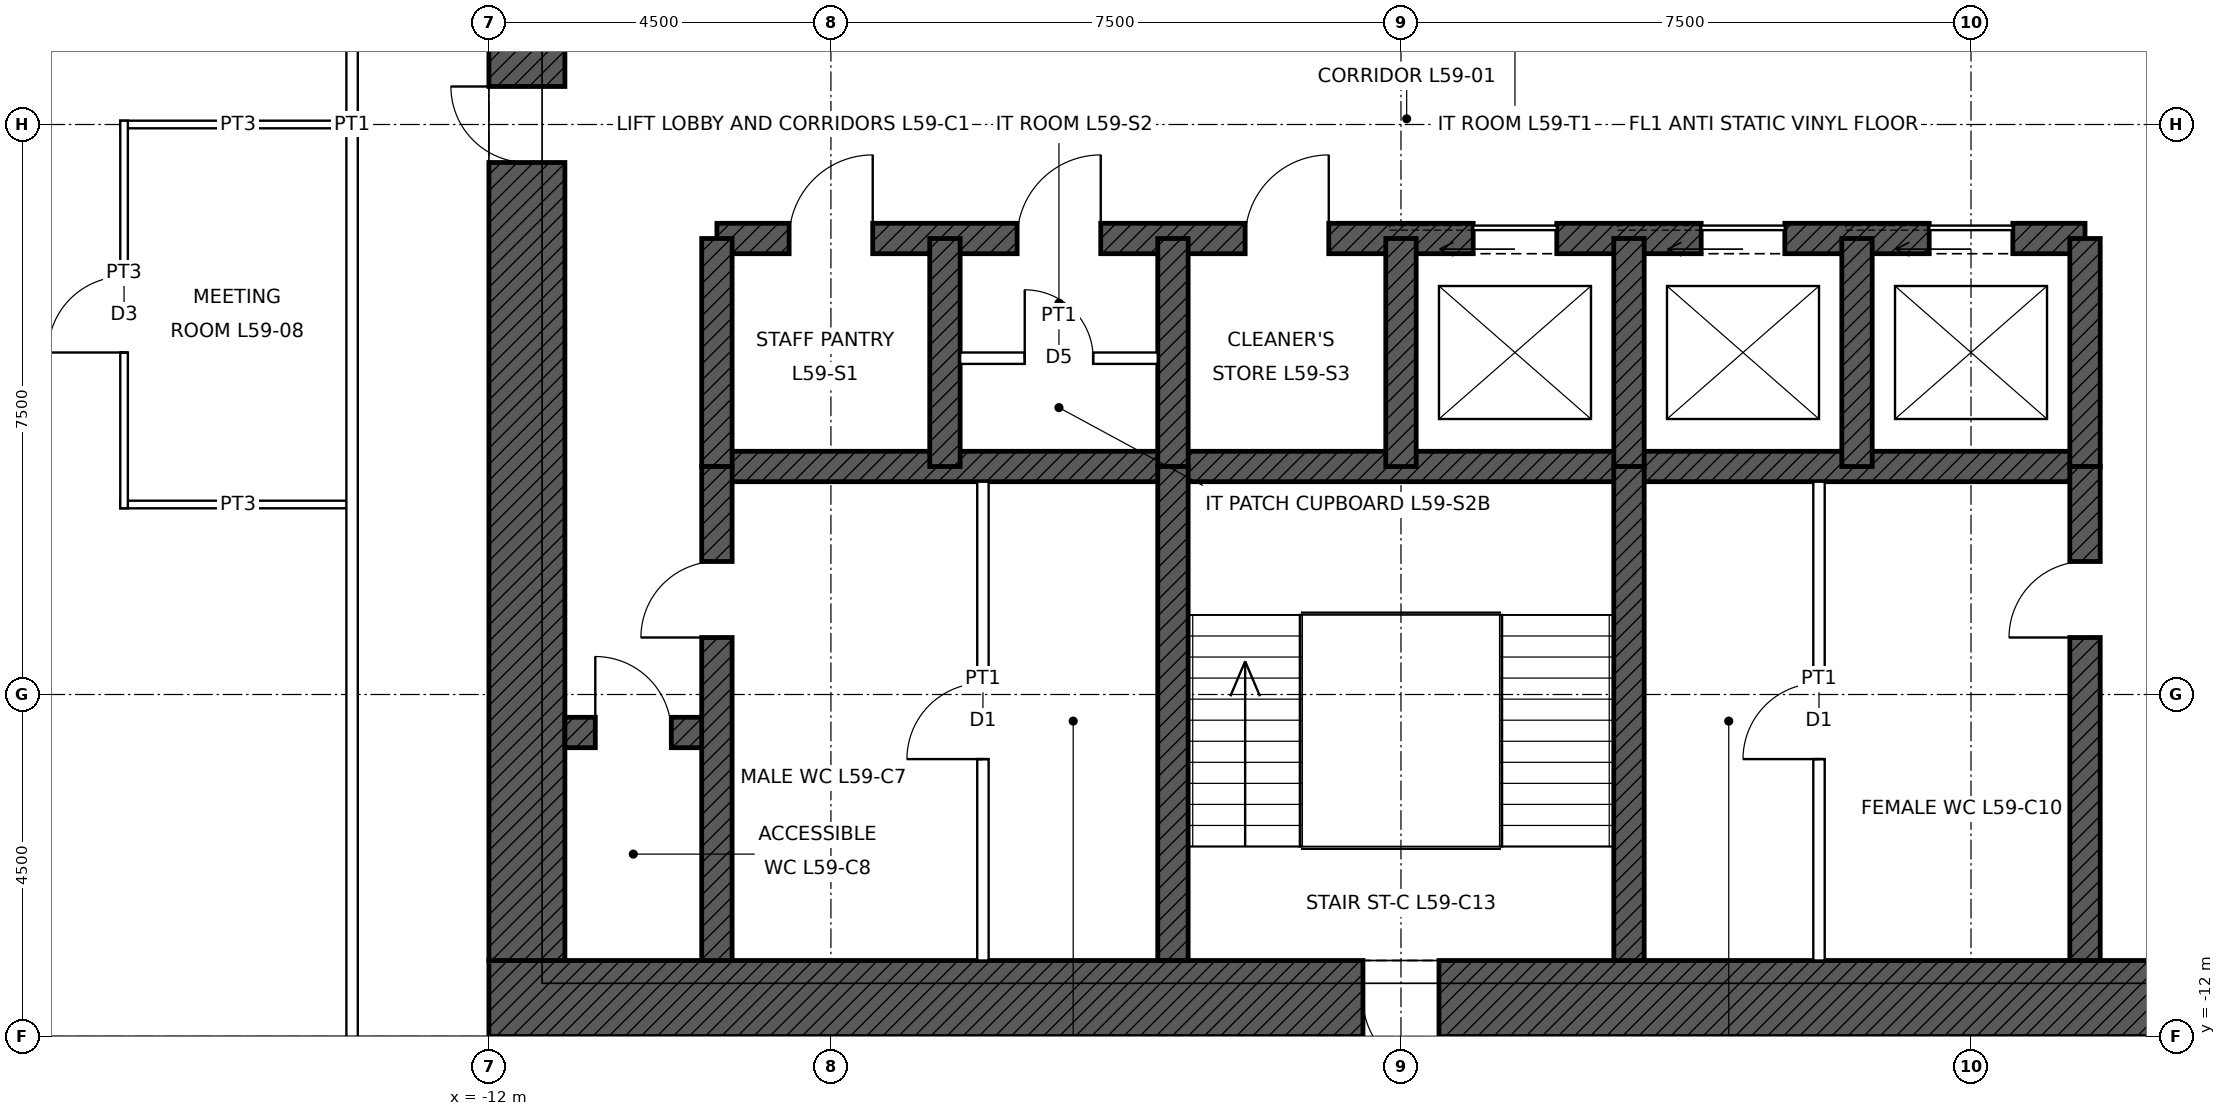
"""IFC4 building model, lengths in metres.
Left out: names, types, materials, properties, quantities, classifications, styles, units other than length and angle.
Written with IfcOpenShell. Run it as: python <this file> out.ifc"""

import sys

from ifc_helpers import new_model, si_unit, direction, frame, frame_2d, origin, place, context, subcontext, project, spatial, rectangle, extrude, element, fill, save


model = new_model("IFC4")
c1 = context("Model", 3, precision=1e-05, world=origin(), true_north=direction((0.0, 1.0)))
c2 = subcontext(c1, "Body", "Model", "MODEL_VIEW")
j1 = project(units=[si_unit("LENGTHUNIT", "METRE"), si_unit("PLANEANGLEUNIT", "RADIAN")], contexts=[c1])
p1 = place(None, origin())
s1 = spatial("IfcSite", under=j1, at=p1, CompositionType="ELEMENT")
p2 = place(p1, origin())
s2 = spatial("IfcBuilding", under=s1, at=p2, CompositionType="ELEMENT")
p3 = place(p2, frame((0.0, 0.0, 271.9)))
s3 = spatial("IfcBuildingStorey", under=s2, at=p3, CompositionType="ELEMENT", Elevation=271.9)
p4 = place(p3, frame((12.0, -11.5, 0.0), z_axis=(0.0, 0.0, 1.0), x_axis=(-1.0, 0.0, 0.0)))
e1 = element("IfcWall", 1, at=p4, inside=s3, PredefinedType="SHEAR", context=c2, shape_type="SweptSolid", body=[
    extrude(rectangle(XDim=24.0, YDim=1.0, at=frame_2d((12.0, 0.0))), origin(), (0.0, 0.0, 1.0), 4.0),
])
p5 = place(p4, frame((11.5, 0.0, 0.0)))
e2 = element("IfcOpeningElement", 2, at=p5, cuts=e1, PredefinedType="OPENING", context=c2, shape_type="SweptSolid", body=[
    extrude(rectangle(XDim=1.0, YDim=2.1, at=frame_2d((0.5, 1.05))), frame((0.0, 0.51, 0.0), z_axis=(0.0, -1.0, 0.0), x_axis=(1.0, 0.0, 0.0)), (0.0, 0.0, 1.0), 1.02),
])
p6 = place(p4, frame((1.0, 0.0, 0.0)))
e3 = element("IfcOpeningElement", 3, at=p6, cuts=e1, PredefinedType="OPENING", context=c2, shape_type="SweptSolid", body=[
    extrude(rectangle(XDim=1.0, YDim=2.4, at=frame_2d((0.5, 1.2))), frame((0.0, 0.51, 0.0), z_axis=(0.0, -1.0, 0.0), x_axis=(1.0, 0.0, 0.0)), (0.0, 0.0, 1.0), 1.02),
])
p7 = place(p3, frame((-11.5, -11.0, 0.0), z_axis=(0.0, 0.0, 1.0), x_axis=(0.0, 1.0, 0.0)))
e4 = element("IfcWall", 4, at=p7, inside=s3, PredefinedType="SHEAR", context=c2, shape_type="SweptSolid", body=[
    extrude(rectangle(XDim=22.0, YDim=1.0, at=frame_2d((11.0, 0.0))), origin(), (0.0, 0.0, 1.0), 4.0),
])
p8 = place(p7, frame((10.5, 0.0, 0.0)))
e5 = element("IfcOpeningElement", 5, at=p8, cuts=e4, PredefinedType="OPENING", context=c2, shape_type="SweptSolid", body=[
    extrude(rectangle(XDim=1.0, YDim=2.4, at=frame_2d((0.5, 1.2))), frame((0.0, 0.51, 0.0), z_axis=(0.0, -1.0, 0.0), x_axis=(1.0, 0.0, 0.0)), (0.0, 0.0, 1.0), 1.02),
])
p9 = place(p3, frame((-9.0, -1.5, 0.0), z_axis=(0.0, 0.0, 1.0), x_axis=(1.0, 0.0, 0.0)))
e6 = element("IfcWall", 6, at=p9, inside=s3, PredefinedType="SHEAR", context=c2, shape_type="SweptSolid", body=[
    extrude(rectangle(XDim=18.0, YDim=0.4, at=frame_2d((9.0, 0.0))), origin(), (0.0, 0.0, 1.0), 4.0),
])
p10 = place(p9, frame((9.95, 0.0, 0.0)))
e7 = element("IfcOpeningElement", 7, at=p10, cuts=e6, PredefinedType="OPENING", context=c2, shape_type="SweptSolid", body=[
    extrude(rectangle(XDim=1.1, YDim=2.1, at=frame_2d((0.55, 1.05))), frame((0.0, 0.21, 0.0), z_axis=(0.0, -1.0, 0.0), x_axis=(1.0, 0.0, 0.0)), (0.0, 0.0, 1.0), 0.42),
])
p11 = place(p9, frame((12.95, 0.0, 0.0)))
e8 = element("IfcOpeningElement", 8, at=p11, cuts=e6, PredefinedType="OPENING", context=c2, shape_type="SweptSolid", body=[
    extrude(rectangle(XDim=1.1, YDim=2.1, at=frame_2d((0.55, 1.05))), frame((0.0, 0.21, 0.0), z_axis=(0.0, -1.0, 0.0), x_axis=(1.0, 0.0, 0.0)), (0.0, 0.0, 1.0), 0.42),
])
p12 = place(p9, frame((15.95, 0.0, 0.0)))
e9 = element("IfcOpeningElement", 9, at=p12, cuts=e6, PredefinedType="OPENING", context=c2, shape_type="SweptSolid", body=[
    extrude(rectangle(XDim=1.1, YDim=2.1, at=frame_2d((0.55, 1.05))), frame((0.0, 0.21, 0.0), z_axis=(0.0, -1.0, 0.0), x_axis=(1.0, 0.0, 0.0)), (0.0, 0.0, 1.0), 0.42),
])
p13 = place(p9, frame((0.95, 0.0, 0.0)))
e10 = element("IfcOpeningElement", 10, at=p13, cuts=e6, PredefinedType="OPENING", context=c2, shape_type="SweptSolid", body=[
    extrude(rectangle(XDim=1.1, YDim=2.1, at=frame_2d((0.55, 1.05))), frame((0.0, 0.21, 0.0), z_axis=(0.0, -1.0, 0.0), x_axis=(1.0, 0.0, 0.0)), (0.0, 0.0, 1.0), 0.42),
])
p14 = place(p9, frame((3.95, 0.0, 0.0)))
e11 = element("IfcOpeningElement", 11, at=p14, cuts=e6, PredefinedType="OPENING", context=c2, shape_type="SweptSolid", body=[
    extrude(rectangle(XDim=1.1, YDim=2.1, at=frame_2d((0.55, 1.05))), frame((0.0, 0.21, 0.0), z_axis=(0.0, -1.0, 0.0), x_axis=(1.0, 0.0, 0.0)), (0.0, 0.0, 1.0), 0.42),
])
p15 = place(p9, frame((6.95, 0.0, 0.0)))
e12 = element("IfcOpeningElement", 12, at=p15, cuts=e6, PredefinedType="OPENING", context=c2, shape_type="SweptSolid", body=[
    extrude(rectangle(XDim=1.1, YDim=2.1, at=frame_2d((0.55, 1.05))), frame((0.0, 0.21, 0.0), z_axis=(0.0, -1.0, 0.0), x_axis=(1.0, 0.0, 0.0)), (0.0, 0.0, 1.0), 0.42),
])
p16 = place(p3, frame((-9.0, -4.5, 0.0), z_axis=(0.0, 0.0, 1.0), x_axis=(1.0, 0.0, 0.0)))
e13 = element("IfcWall", 13, at=p16, inside=s3, PredefinedType="SHEAR", context=c2, shape_type="SweptSolid", body=[
    extrude(rectangle(XDim=18.0, YDim=0.4, at=frame_2d((9.0, 0.0))), origin(), (0.0, 0.0, 1.0), 4.0),
])
p17 = place(p3, frame((-11.0, -8.0, 0.0), z_axis=(0.0, 0.0, 1.0), x_axis=(1.0, 0.0, 0.0)))
e14 = element("IfcWall", 14, at=p17, inside=s3, PredefinedType="SHEAR", context=c2, shape_type="SweptSolid", body=[
    extrude(rectangle(XDim=2.0, YDim=0.4, at=frame_2d((1.0, 0.0))), origin(), (0.0, 0.0, 1.0), 4.0),
])
p18 = place(p17, frame((0.4, 0.0, 0.0)))
e15 = element("IfcOpeningElement", 15, at=p18, cuts=e14, PredefinedType="OPENING", context=c2, shape_type="SweptSolid", body=[
    extrude(rectangle(XDim=1.0, YDim=2.1, at=frame_2d((0.5, 1.05))), frame((0.0, 0.21, 0.0), z_axis=(0.0, -1.0, 0.0), x_axis=(1.0, 0.0, 0.0)), (0.0, 0.0, 1.0), 0.42),
])
for number, where, z_axis, x_axis in (
    (16, (-9.0, -4.5, 0.0), (0.0, 0.0, 1.0), (0.0, 1.0, 0.0)),
    (17, (9.0, -4.5, 0.0), (0.0, 0.0, 1.0), (0.0, 1.0, 0.0)),
    (18, (-6.0, -4.5, 0.0), (0.0, 0.0, 1.0), (0.0, 1.0, 0.0)),
    (19, (-3.0, -4.5, 0.0), (0.0, 0.0, 1.0), (0.0, 1.0, 0.0)),
    (20, (0.0, -4.5, 0.0), (0.0, 0.0, 1.0), (0.0, 1.0, 0.0)),
    (21, (3.0, -4.5, 0.0), (0.0, 0.0, 1.0), (0.0, 1.0, 0.0)),
    (22, (6.0, -4.5, 0.0), (0.0, 0.0, 1.0), (0.0, 1.0, 0.0)),
):
    element("IfcWall", number, at=place(p3, frame(where, z_axis=z_axis, x_axis=x_axis)), inside=s3, PredefinedType="SHEAR", context=c2, shape_type="SweptSolid", body=[
        extrude(rectangle(XDim=3.0, YDim=0.4, at=frame_2d((1.5, 0.0))), origin(), (0.0, 0.0, 1.0), 4.0),
    ])
p19 = place(p3, frame((-9.0, -11.0, 0.0), z_axis=(0.0, 0.0, 1.0), x_axis=(0.0, 1.0, 0.0)))
e23 = element("IfcWall", 23, at=p19, inside=s3, PredefinedType="SHEAR", context=c2, shape_type="SweptSolid", body=[
    extrude(rectangle(XDim=6.5, YDim=0.4, at=frame_2d((3.25, 0.0))), origin(), (0.0, 0.0, 1.0), 4.0),
])
p20 = place(p19, frame((4.25, 0.0, 0.0)))
e24 = element("IfcOpeningElement", 24, at=p20, cuts=e23, PredefinedType="OPENING", context=c2, shape_type="SweptSolid", body=[
    extrude(rectangle(XDim=1.0, YDim=2.1, at=frame_2d((0.5, 1.05))), frame((0.0, 0.21, 0.0), z_axis=(0.0, -1.0, 0.0), x_axis=(1.0, 0.0, 0.0)), (0.0, 0.0, 1.0), 0.42),
])
p21 = place(p3, frame((9.0, -11.0, 0.0), z_axis=(0.0, 0.0, 1.0), x_axis=(0.0, 1.0, 0.0)))
e25 = element("IfcWall", 25, at=p21, inside=s3, PredefinedType="SHEAR", context=c2, shape_type="SweptSolid", body=[
    extrude(rectangle(XDim=6.5, YDim=0.4, at=frame_2d((3.25, 0.0))), origin(), (0.0, 0.0, 1.0), 4.0),
])
p22 = place(p21, frame((4.25, 0.0, 0.0)))
e26 = element("IfcOpeningElement", 26, at=p22, cuts=e25, PredefinedType="OPENING", context=c2, shape_type="SweptSolid", body=[
    extrude(rectangle(XDim=1.0, YDim=2.1, at=frame_2d((0.5, 1.05))), frame((0.0, 0.21, 0.0), z_axis=(0.0, -1.0, 0.0), x_axis=(1.0, 0.0, 0.0)), (0.0, 0.0, 1.0), 0.42),
])
for number, where, z_axis, x_axis in (
    (27, (-3.0, -11.0, 0.0), (0.0, 0.0, 1.0), (0.0, 1.0, 0.0)),
    (28, (3.0, -11.0, 0.0), (0.0, 0.0, 1.0), (0.0, 1.0, 0.0)),
):
    element("IfcWall", number, at=place(p3, frame(where, z_axis=z_axis, x_axis=x_axis)), inside=s3, PredefinedType="SHEAR", context=c2, shape_type="SweptSolid", body=[
        extrude(rectangle(XDim=6.5, YDim=0.4, at=frame_2d((3.25, 0.0))), origin(), (0.0, 0.0, 1.0), 4.0),
    ])
p23 = place(p3, frame((-16.85, -5.0, 0.0), z_axis=(0.0, 0.0, 1.0), x_axis=(1.0, 0.0, 0.0)))
e29 = element("IfcWall", 29, at=p23, inside=s3, PredefinedType="PARTITIONING", context=c2, shape_type="SweptSolid", body=[
    extrude(rectangle(XDim=3.1, YDim=0.1, at=frame_2d((1.55, 0.0))), origin(), (0.0, 0.0, 1.0), 3.85),
])
p24 = place(p3, frame((-16.85, 0.0, 0.0), z_axis=(0.0, 0.0, 1.0), x_axis=(1.0, 0.0, 0.0)))
e30 = element("IfcWall", 30, at=p24, inside=s3, PredefinedType="PARTITIONING", context=c2, shape_type="SweptSolid", body=[
    extrude(rectangle(XDim=3.1, YDim=0.1, at=frame_2d((1.55, 0.0))), origin(), (0.0, 0.0, 1.0), 3.243),
])
p25 = place(p3, frame((-16.8, -5.05, 0.0), z_axis=(0.0, 0.0, 1.0), x_axis=(0.0, 1.0, 0.0)))
e31 = element("IfcWall", 31, at=p25, inside=s3, PredefinedType="PARTITIONING", context=c2, shape_type="SweptSolid", body=[
    extrude(rectangle(XDim=5.1, YDim=0.1, at=frame_2d((2.55, 0.0))), origin(), (0.0, 0.0, 1.0), 3.85),
])
p26 = place(p25, frame((2.05, 0.0, 0.0)))
e32 = element("IfcOpeningElement", 32, at=p26, cuts=e31, PredefinedType="OPENING", context=c2, shape_type="SweptSolid", body=[
    extrude(rectangle(XDim=1.0, YDim=2.1, at=frame_2d((0.5, 1.05))), frame((0.0, 0.06, 0.0), z_axis=(0.0, -1.0, 0.0), x_axis=(1.0, 0.0, 0.0)), (0.0, 0.0, 1.0), 0.12),
])
p27 = place(p3, frame((-13.8, -13.875, 0.0), z_axis=(0.0, 0.0, 1.0), x_axis=(0.0, 1.0, 0.0)))
e33 = element("IfcWall", 33, at=p27, inside=s3, PredefinedType="PARTITIONING", context=c2, shape_type="SweptSolid", body=[
    extrude(rectangle(XDim=27.75, YDim=0.15, at=frame_2d((13.875, 0.0))), origin(), (0.0, 0.0, 1.0), 3.85),
])
p28 = place(p3, frame((-5.5, -11.0, 0.0), z_axis=(0.0, 0.0, 1.0), x_axis=(0.0, 1.0, 0.0)))
e34 = element("IfcWall", 34, at=p28, inside=s3, PredefinedType="PARTITIONING", context=c2, shape_type="SweptSolid", body=[
    extrude(rectangle(XDim=6.3, YDim=0.15, at=frame_2d((3.15, 0.0))), origin(), (0.0, 0.0, 1.0), 3.75),
])
p29 = place(p28, frame((2.65, 0.0, 0.0)))
e35 = element("IfcOpeningElement", 35, at=p29, cuts=e34, PredefinedType="OPENING", context=c2, shape_type="SweptSolid", body=[
    extrude(rectangle(XDim=1.0, YDim=2.1, at=frame_2d((0.5, 1.05))), frame((0.0, 0.085, 0.0), z_axis=(0.0, -1.0, 0.0), x_axis=(1.0, 0.0, 0.0)), (0.0, 0.0, 1.0), 0.17),
])
p30 = place(p3, frame((5.5, -11.0, 0.0), z_axis=(0.0, 0.0, 1.0), x_axis=(0.0, 1.0, 0.0)))
e36 = element("IfcWall", 36, at=p30, inside=s3, PredefinedType="PARTITIONING", context=c2, shape_type="SweptSolid", body=[
    extrude(rectangle(XDim=6.3, YDim=0.15, at=frame_2d((3.15, 0.0))), origin(), (0.0, 0.0, 1.0), 3.75),
])
p31 = place(p30, frame((2.65, 0.0, 0.0)))
e37 = element("IfcOpeningElement", 37, at=p31, cuts=e36, PredefinedType="OPENING", context=c2, shape_type="SweptSolid", body=[
    extrude(rectangle(XDim=1.0, YDim=2.1, at=frame_2d((0.5, 1.05))), frame((0.0, 0.085, 0.0), z_axis=(0.0, -1.0, 0.0), x_axis=(1.0, 0.0, 0.0)), (0.0, 0.0, 1.0), 0.17),
])
p32 = place(p3, frame((-5.8, -3.075, 0.0), z_axis=(0.0, 0.0, 1.0), x_axis=(1.0, 0.0, 0.0)))
e38 = element("IfcWall", 38, at=p32, inside=s3, PredefinedType="PARTITIONING", context=c2, shape_type="SweptSolid", body=[
    extrude(rectangle(XDim=2.6, YDim=0.15, at=frame_2d((1.3, 0.0))), origin(), (0.0, 0.0, 1.0), 3.75),
])
p33 = place(p32, frame((0.85, 0.0, 0.0)))
e39 = element("IfcOpeningElement", 39, at=p33, cuts=e38, PredefinedType="OPENING", context=c2, shape_type="SweptSolid", body=[
    extrude(rectangle(XDim=0.9, YDim=2.1, at=frame_2d((0.45, 1.05))), frame((0.0, 0.085, 0.0), z_axis=(0.0, -1.0, 0.0), x_axis=(1.0, 0.0, 0.0)), (0.0, 0.0, 1.0), 0.17),
])
p34 = place(p5, origin())
e40 = element("IfcDoor", 40, at=p34, inside=s3, OperationType="SINGLE_SWING_LEFT", PredefinedType="DOOR", context=c2, shape_type="SweptSolid", body=[
    extrude(rectangle(XDim=1.0, YDim=2.1, at=frame_2d((0.5, 1.05))), frame((0.0, 0.485, 0.0), z_axis=(0.0, -1.0, 0.0), x_axis=(1.0, 0.0, 0.0)), (0.0, 0.0, 1.0), 0.05),
])
fill(e2, e40)
p35 = place(p8, origin())
e41 = element("IfcDoor", 41, at=p35, inside=s3, OperationType="SINGLE_SWING_RIGHT", PredefinedType="DOOR", context=c2, shape_type="SweptSolid", body=[
    extrude(rectangle(XDim=1.0, YDim=2.4, at=frame_2d((0.5, 1.2))), frame((0.0, 0.485, 0.0), z_axis=(0.0, -1.0, 0.0), x_axis=(1.0, 0.0, 0.0)), (0.0, 0.0, 1.0), 0.05),
])
fill(e5, e41)
p36 = place(p20, origin())
e42 = element("IfcDoor", 42, at=p36, inside=s3, OperationType="SINGLE_SWING_LEFT", PredefinedType="DOOR", context=c2, shape_type="SweptSolid", body=[
    extrude(rectangle(XDim=1.0, YDim=2.1, at=frame_2d((0.5, 1.05))), frame((0.0, 0.025, 0.0), z_axis=(0.0, -1.0, 0.0), x_axis=(1.0, 0.0, 0.0)), (0.0, 0.0, 1.0), 0.05),
])
fill(e24, e42)
p37 = place(p22, origin())
e43 = element("IfcDoor", 43, at=p37, inside=s3, OperationType="SINGLE_SWING_LEFT", PredefinedType="DOOR", context=c2, shape_type="SweptSolid", body=[
    extrude(rectangle(XDim=1.0, YDim=2.1, at=frame_2d((0.5, 1.05))), frame((0.0, 0.025, 0.0), z_axis=(0.0, -1.0, 0.0), x_axis=(1.0, 0.0, 0.0)), (0.0, 0.0, 1.0), 0.05),
])
fill(e26, e43)
p38 = place(p18, origin())
e44 = element("IfcDoor", 44, at=p38, inside=s3, OperationType="SINGLE_SWING_LEFT", PredefinedType="DOOR", context=c2, shape_type="SweptSolid", body=[
    extrude(rectangle(XDim=1.0, YDim=2.1, at=frame_2d((0.5, 1.05))), frame((0.0, 0.025, 0.0), z_axis=(0.0, -1.0, 0.0), x_axis=(1.0, 0.0, 0.0)), (0.0, 0.0, 1.0), 0.05),
])
fill(e15, e44)
p39 = place(p10, origin())
e45 = element("IfcDoor", 45, at=p39, inside=s3, OperationType="SLIDING_TO_LEFT", PredefinedType="DOOR", context=c2, shape_type="SweptSolid", body=[
    extrude(rectangle(XDim=1.1, YDim=2.1, at=frame_2d((0.55, 1.05))), frame((0.0, 0.025, 0.0), z_axis=(0.0, -1.0, 0.0), x_axis=(1.0, 0.0, 0.0)), (0.0, 0.0, 1.0), 0.05),
])
fill(e7, e45)
p40 = place(p11, origin())
e46 = element("IfcDoor", 46, at=p40, inside=s3, OperationType="SLIDING_TO_LEFT", PredefinedType="DOOR", context=c2, shape_type="SweptSolid", body=[
    extrude(rectangle(XDim=1.1, YDim=2.1, at=frame_2d((0.55, 1.05))), frame((0.0, 0.025, 0.0), z_axis=(0.0, -1.0, 0.0), x_axis=(1.0, 0.0, 0.0)), (0.0, 0.0, 1.0), 0.05),
])
fill(e8, e46)
p41 = place(p12, origin())
e47 = element("IfcDoor", 47, at=p41, inside=s3, OperationType="SLIDING_TO_LEFT", PredefinedType="DOOR", context=c2, shape_type="SweptSolid", body=[
    extrude(rectangle(XDim=1.1, YDim=2.1, at=frame_2d((0.55, 1.05))), frame((0.0, 0.025, 0.0), z_axis=(0.0, -1.0, 0.0), x_axis=(1.0, 0.0, 0.0)), (0.0, 0.0, 1.0), 0.05),
])
fill(e9, e47)
p42 = place(p29, origin())
e48 = element("IfcDoor", 48, at=p42, inside=s3, OperationType="SINGLE_SWING_LEFT", PredefinedType="DOOR", context=c2, shape_type="SweptSolid", body=[
    extrude(rectangle(XDim=1.0, YDim=2.1, at=frame_2d((0.5, 1.05))), frame((0.0, 0.025, 0.0), z_axis=(0.0, -1.0, 0.0), x_axis=(1.0, 0.0, 0.0)), (0.0, 0.0, 1.0), 0.05),
])
fill(e35, e48)
p43 = place(p31, origin())
e49 = element("IfcDoor", 49, at=p43, inside=s3, OperationType="SINGLE_SWING_LEFT", PredefinedType="DOOR", context=c2, shape_type="SweptSolid", body=[
    extrude(rectangle(XDim=1.0, YDim=2.1, at=frame_2d((0.5, 1.05))), frame((0.0, 0.025, 0.0), z_axis=(0.0, -1.0, 0.0), x_axis=(1.0, 0.0, 0.0)), (0.0, 0.0, 1.0), 0.05),
])
fill(e37, e49)
p44 = place(p13, origin())
e50 = element("IfcDoor", 50, at=p44, inside=s3, OperationType="SINGLE_SWING_RIGHT", PredefinedType="DOOR", context=c2, shape_type="SweptSolid", body=[
    extrude(rectangle(XDim=1.1, YDim=2.1, at=frame_2d((0.55, 1.05))), frame((0.0, 0.025, 0.0), z_axis=(0.0, -1.0, 0.0), x_axis=(1.0, 0.0, 0.0)), (0.0, 0.0, 1.0), 0.05),
])
fill(e10, e50)
p45 = place(p14, origin())
e51 = element("IfcDoor", 51, at=p45, inside=s3, OperationType="SINGLE_SWING_RIGHT", PredefinedType="DOOR", context=c2, shape_type="SweptSolid", body=[
    extrude(rectangle(XDim=1.1, YDim=2.1, at=frame_2d((0.55, 1.05))), frame((0.0, 0.025, 0.0), z_axis=(0.0, -1.0, 0.0), x_axis=(1.0, 0.0, 0.0)), (0.0, 0.0, 1.0), 0.05),
])
fill(e11, e51)
p46 = place(p33, origin())
e52 = element("IfcDoor", 52, at=p46, inside=s3, OperationType="SINGLE_SWING_LEFT", PredefinedType="DOOR", context=c2, shape_type="SweptSolid", body=[
    extrude(rectangle(XDim=0.9, YDim=2.1, at=frame_2d((0.45, 1.05))), frame((0.0, 0.025, 0.0), z_axis=(0.0, -1.0, 0.0), x_axis=(1.0, 0.0, 0.0)), (0.0, 0.0, 1.0), 0.05),
])
fill(e39, e52)
p47 = place(p15, origin())
e53 = element("IfcDoor", 53, at=p47, inside=s3, OperationType="SINGLE_SWING_RIGHT", PredefinedType="DOOR", context=c2, shape_type="SweptSolid", body=[
    extrude(rectangle(XDim=1.1, YDim=2.1, at=frame_2d((0.55, 1.05))), frame((0.0, 0.025, 0.0), z_axis=(0.0, -1.0, 0.0), x_axis=(1.0, 0.0, 0.0)), (0.0, 0.0, 1.0), 0.05),
])
fill(e12, e53)
p48 = place(p26, origin())
e54 = element("IfcDoor", 54, at=p48, inside=s3, OperationType="SINGLE_SWING_LEFT", PredefinedType="DOOR", context=c2, shape_type="SweptSolid", body=[
    extrude(rectangle(XDim=1.0, YDim=2.1, at=frame_2d((0.5, 1.05))), frame((0.0, 0.025, 0.0), z_axis=(0.0, -1.0, 0.0), x_axis=(1.0, 0.0, 0.0)), (0.0, 0.0, 1.0), 0.05),
])
fill(e32, e54)
save(model, sys.argv[1])
